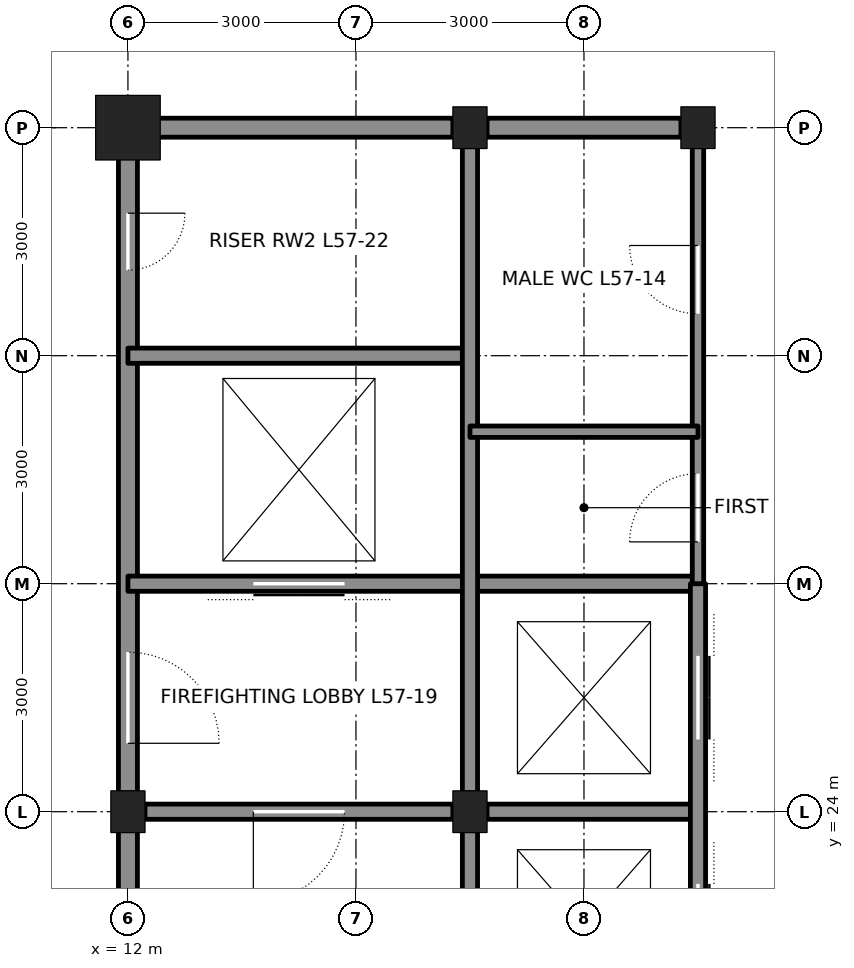
"""IFC4 building model, lengths in metres.
Left out: names, types, materials, properties, quantities, classifications, styles, units other than length and angle.
Written with IfcOpenShell. Run it as: python <this file> out.ifc"""

import sys

from ifc_helpers import new_model, si_unit, direction, frame, frame_2d, origin, origin_2d, place, context, subcontext, project, spatial, rectangle, hollow_rectangle, i_section, extrude, element, fill, save


model = new_model("IFC4")
c1 = context("Model", 3, precision=1e-05, world=origin(), true_north=direction((0.0, 1.0)))
c2 = subcontext(c1, "Body", "Model", "MODEL_VIEW")
j1 = project(units=[si_unit("LENGTHUNIT", "METRE"), si_unit("PLANEANGLEUNIT", "RADIAN")], contexts=[c1])
p1 = place(None, origin())
s1 = spatial("IfcSite", under=j1, at=p1, CompositionType="ELEMENT")
p2 = place(p1, origin())
s2 = spatial("IfcBuilding", under=s1, at=p2, CompositionType="ELEMENT")
p3 = place(p2, frame((0.0, 0.0, 257.7)))
s3 = spatial("IfcBuildingStorey", under=s2, at=p3, CompositionType="ELEMENT", Elevation=257.7)
p4 = place(p3, frame((12.0, 33.0, 0.0), z_axis=(0.0, 0.0, 1.0), x_axis=(1.0, 0.0, 0.0)))
e1 = element("IfcColumn", 1, at=p4, inside=s3, PredefinedType="COLUMN", context=c2, shape_type="SweptSolid", body=[
    extrude(hollow_rectangle(XDim=0.85, YDim=0.85, WallThickness=0.085, at=origin_2d()), origin(), (0.0, 0.0, 1.0), 4.5),
])
for number, where, z_axis, x_axis in (
    (2, (16.5, 33.0, 0.0), (0.0, 0.0, 1.0), (1.0, 0.0, 0.0)),
    (3, (19.5, 33.0, 0.0), (0.0, 0.0, 1.0), (1.0, 0.0, 0.0)),
    (4, (12.0, 24.0, 0.0), (0.0, 0.0, 1.0), (1.0, 0.0, 0.0)),
    (5, (16.5, 24.0, 0.0), (0.0, 0.0, 1.0), (1.0, 0.0, 0.0)),
):
    element("IfcColumn", number, at=place(p3, frame(where, z_axis=z_axis, x_axis=x_axis)), inside=s3, PredefinedType="COLUMN", context=c2, shape_type="SweptSolid", body=[
        extrude(i_section(OverallWidth=0.449, OverallDepth=0.549, WebThickness=0.072, FlangeThickness=0.115, at=origin_2d()), origin(), (0.0, 0.0, 1.0), 4.5),
    ])
p5 = place(p3, frame((12.0, 21.25, 0.0), z_axis=(0.0, 0.0, 1.0), x_axis=(0.0, 1.0, 0.0)))
e6 = element("IfcWall", 6, at=p5, inside=s3, PredefinedType="SOLIDWALL", context=c2, shape_type="SweptSolid", body=[
    extrude(rectangle(XDim=2.5, YDim=0.25, at=frame_2d((1.25, 0.0))), origin(), (0.0, 0.0, 1.0), 3.413),
])
p6 = place(p3, frame((12.0, 24.25, 0.0), z_axis=(0.0, 0.0, 1.0), x_axis=(0.0, 1.0, 0.0)))
e7 = element("IfcWall", 7, at=p6, inside=s3, PredefinedType="SOLIDWALL", context=c2, shape_type="SweptSolid", body=[
    extrude(rectangle(XDim=8.5, YDim=0.25, at=frame_2d((4.25, 0.0))), origin(), (0.0, 0.0, 1.0), 3.413),
])
p7 = place(p6, frame((0.65, 0.0, 0.0)))
e8 = element("IfcOpeningElement", 8, at=p7, cuts=e7, PredefinedType="OPENING", context=c2, shape_type="SweptSolid", body=[
    extrude(rectangle(XDim=1.2, YDim=2.1, at=frame_2d((0.6, 1.05))), frame((0.0, 0.135, 0.0), z_axis=(0.0, -1.0, 0.0), x_axis=(1.0, 0.0, 0.0)), (0.0, 0.0, 1.0), 0.27),
])
p8 = place(p6, frame((6.875, 0.0, 0.0)))
e9 = element("IfcOpeningElement", 9, at=p8, cuts=e7, PredefinedType="OPENING", context=c2, shape_type="SweptSolid", body=[
    extrude(rectangle(XDim=0.75, YDim=2.1, at=frame_2d((0.375, 1.05))), frame((0.0, 0.135, 0.0), z_axis=(0.0, -1.0, 0.0), x_axis=(1.0, 0.0, 0.0)), (0.0, 0.0, 1.0), 0.27),
])
p9 = place(p3, frame((12.225, 24.0, 0.0), z_axis=(0.0, 0.0, 1.0), x_axis=(1.0, 0.0, 0.0)))
e10 = element("IfcWall", 10, at=p9, inside=s3, PredefinedType="SOLIDWALL", context=c2, shape_type="SweptSolid", body=[
    extrude(rectangle(XDim=4.05, YDim=0.2, at=frame_2d((2.025, 0.0))), origin(), (0.0, 0.0, 1.0), 3.39),
])
p10 = place(p9, frame((1.425, 0.0, 0.0)))
e11 = element("IfcOpeningElement", 11, at=p10, cuts=e10, PredefinedType="OPENING", context=c2, shape_type="SweptSolid", body=[
    extrude(rectangle(XDim=1.2, YDim=2.1, at=frame_2d((0.6, 1.05))), frame((0.0, 0.11, 0.0), z_axis=(0.0, -1.0, 0.0), x_axis=(1.0, 0.0, 0.0)), (0.0, 0.0, 1.0), 0.22),
])
p11 = place(p3, frame((16.725, 24.0, 0.0), z_axis=(0.0, 0.0, 1.0), x_axis=(1.0, 0.0, 0.0)))
e12 = element("IfcWall", 12, at=p11, inside=s3, PredefinedType="SOLIDWALL", context=c2, shape_type="SweptSolid", body=[
    extrude(rectangle(XDim=2.775, YDim=0.2, at=frame_2d((1.388, 0.0))), origin(), (0.0, 0.0, 1.0), 3.39),
])
p12 = place(p3, frame((12.0, 27.0, 0.0), z_axis=(0.0, 0.0, 1.0), x_axis=(1.0, 0.0, 0.0)))
e13 = element("IfcWall", 13, at=p12, inside=s3, PredefinedType="SOLIDWALL", context=c2, shape_type="SweptSolid", body=[
    extrude(rectangle(XDim=7.5, YDim=0.2, at=frame_2d((3.75, 0.0))), origin(), (0.0, 0.0, 1.0), 4.34),
])
p13 = place(p12, frame((1.65, 0.0, 0.0)))
e14 = element("IfcOpeningElement", 14, at=p13, cuts=e13, PredefinedType="OPENING", context=c2, shape_type="SweptSolid", body=[
    extrude(rectangle(XDim=1.2, YDim=2.1, at=frame_2d((0.6, 1.05))), frame((0.0, 0.11, 0.0), z_axis=(0.0, -1.0, 0.0), x_axis=(1.0, 0.0, 0.0)), (0.0, 0.0, 1.0), 0.22),
])
p14 = place(p3, frame((12.0, 30.0, 0.0), z_axis=(0.0, 0.0, 1.0), x_axis=(1.0, 0.0, 0.0)))
e15 = element("IfcWall", 15, at=p14, inside=s3, PredefinedType="SOLIDWALL", context=c2, shape_type="SweptSolid", body=[
    extrude(rectangle(XDim=4.5, YDim=0.2, at=frame_2d((2.25, 0.0))), origin(), (0.0, 0.0, 1.0), 4.34),
])
p15 = place(p3, frame((12.25, 33.0, 0.0), z_axis=(0.0, 0.0, 1.0), x_axis=(1.0, 0.0, 0.0)))
e16 = element("IfcWall", 16, at=p15, inside=s3, PredefinedType="SOLIDWALL", context=c2, shape_type="SweptSolid", body=[
    extrude(rectangle(XDim=4.025, YDim=0.25, at=frame_2d((2.013, 0.0))), origin(), (0.0, 0.0, 1.0), 3.481),
])
p16 = place(p3, frame((16.725, 33.0, 0.0), z_axis=(0.0, 0.0, 1.0), x_axis=(1.0, 0.0, 0.0)))
e17 = element("IfcWall", 17, at=p16, inside=s3, PredefinedType="SOLIDWALL", context=c2, shape_type="SweptSolid", body=[
    extrude(rectangle(XDim=2.55, YDim=0.25, at=frame_2d((1.275, 0.0))), origin(), (0.0, 0.0, 1.0), 3.481),
])
p17 = place(p3, frame((16.5, 21.25, 0.0), z_axis=(0.0, 0.0, 1.0), x_axis=(0.0, 1.0, 0.0)))
e18 = element("IfcWall", 18, at=p17, inside=s3, PredefinedType="SOLIDWALL", context=c2, shape_type="SweptSolid", body=[
    extrude(rectangle(XDim=2.5, YDim=0.2, at=frame_2d((1.25, 0.0))), origin(), (0.0, 0.0, 1.0), 3.413),
])
p18 = place(p3, frame((16.5, 24.25, 0.0), z_axis=(0.0, 0.0, 1.0), x_axis=(0.0, 1.0, 0.0)))
e19 = element("IfcWall", 19, at=p18, inside=s3, PredefinedType="SOLIDWALL", context=c2, shape_type="SweptSolid", body=[
    extrude(rectangle(XDim=8.5, YDim=0.2, at=frame_2d((4.25, 0.0))), origin(), (0.0, 0.0, 1.0), 3.413),
])
p19 = place(p3, frame((19.5, 15.0, 0.0), z_axis=(0.0, 0.0, 1.0), x_axis=(0.0, 1.0, 0.0)))
e20 = element("IfcWall", 20, at=p19, inside=s3, PredefinedType="SOLIDWALL", context=c2, shape_type="SweptSolid", body=[
    extrude(rectangle(XDim=12.0, YDim=0.2, at=frame_2d((6.0, 0.0))), origin(), (0.0, 0.0, 1.0), 3.365),
])
p20 = place(p19, frame((0.95, 0.0, 0.0)))
e21 = element("IfcOpeningElement", 21, at=p20, cuts=e20, PredefinedType="OPENING", context=c2, shape_type="SweptSolid", body=[
    extrude(rectangle(XDim=1.1, YDim=2.1, at=frame_2d((0.55, 1.05))), frame((0.0, 0.11, 0.0), z_axis=(0.0, -1.0, 0.0), x_axis=(1.0, 0.0, 0.0)), (0.0, 0.0, 1.0), 0.22),
])
p21 = place(p19, frame((3.95, 0.0, 0.0)))
e22 = element("IfcOpeningElement", 22, at=p21, cuts=e20, PredefinedType="OPENING", context=c2, shape_type="SweptSolid", body=[
    extrude(rectangle(XDim=1.1, YDim=2.1, at=frame_2d((0.55, 1.05))), frame((0.0, 0.11, 0.0), z_axis=(0.0, -1.0, 0.0), x_axis=(1.0, 0.0, 0.0)), (0.0, 0.0, 1.0), 0.22),
])
p22 = place(p19, frame((6.95, 0.0, 0.0)))
e23 = element("IfcOpeningElement", 23, at=p22, cuts=e20, PredefinedType="OPENING", context=c2, shape_type="SweptSolid", body=[
    extrude(rectangle(XDim=1.1, YDim=2.1, at=frame_2d((0.55, 1.05))), frame((0.0, 0.11, 0.0), z_axis=(0.0, -1.0, 0.0), x_axis=(1.0, 0.0, 0.0)), (0.0, 0.0, 1.0), 0.22),
])
p23 = place(p19, frame((9.95, 0.0, 0.0)))
e24 = element("IfcOpeningElement", 24, at=p23, cuts=e20, PredefinedType="OPENING", context=c2, shape_type="SweptSolid", body=[
    extrude(rectangle(XDim=1.1, YDim=2.1, at=frame_2d((0.55, 1.05))), frame((0.0, 0.11, 0.0), z_axis=(0.0, -1.0, 0.0), x_axis=(1.0, 0.0, 0.0)), (0.0, 0.0, 1.0), 0.22),
])
p24 = place(p3, frame((19.5, 27.0, 0.0), z_axis=(0.0, 0.0, 1.0), x_axis=(0.0, 1.0, 0.0)))
e25 = element("IfcWall", 25, at=p24, inside=s3, PredefinedType="PARTITIONING", context=c2, shape_type="SweptSolid", body=[
    extrude(rectangle(XDim=5.75, YDim=0.15, at=frame_2d((2.875, 0.0))), origin(), (0.0, 0.0, 1.0), 3.365),
])
p25 = place(p24, frame((0.55, 0.0, 0.0)))
e26 = element("IfcOpeningElement", 26, at=p25, cuts=e25, PredefinedType="OPENING", context=c2, shape_type="SweptSolid", body=[
    extrude(rectangle(XDim=0.9, YDim=2.1, at=frame_2d((0.45, 1.05))), frame((0.0, 0.085, 0.0), z_axis=(0.0, -1.0, 0.0), x_axis=(1.0, 0.0, 0.0)), (0.0, 0.0, 1.0), 0.17),
])
p26 = place(p24, frame((3.55, 0.0, 0.0)))
e27 = element("IfcOpeningElement", 27, at=p26, cuts=e25, PredefinedType="OPENING", context=c2, shape_type="SweptSolid", body=[
    extrude(rectangle(XDim=0.9, YDim=2.1, at=frame_2d((0.45, 1.05))), frame((0.0, 0.085, 0.0), z_axis=(0.0, -1.0, 0.0), x_axis=(1.0, 0.0, 0.0)), (0.0, 0.0, 1.0), 0.17),
])
p27 = place(p3, frame((16.5, 29.0, 0.0), z_axis=(0.0, 0.0, 1.0), x_axis=(1.0, 0.0, 0.0)))
e28 = element("IfcWall", 28, at=p27, inside=s3, PredefinedType="PARTITIONING", context=c2, shape_type="SweptSolid", body=[
    extrude(rectangle(XDim=3.0, YDim=0.15, at=frame_2d((1.5, 0.0))), origin(), (0.0, 0.0, 1.0), 4.34),
])
p28 = place(p10, frame((1.2, 0.0, 0.0), z_axis=(0.0, 0.0, 1.0), x_axis=(-1.0, 0.0, 0.0)))
e29 = element("IfcDoor", 29, at=p28, inside=s3, OperationType="SINGLE_SWING_RIGHT", PredefinedType="DOOR", context=c2, shape_type="SweptSolid", body=[
    extrude(rectangle(XDim=1.2, YDim=2.1, at=frame_2d((0.6, 1.05))), frame((0.0, 0.025, 0.0), z_axis=(0.0, -1.0, 0.0), x_axis=(1.0, 0.0, 0.0)), (0.0, 0.0, 1.0), 0.05),
])
fill(e11, e29)
p29 = place(p7, frame((1.2, 0.0, 0.0), z_axis=(0.0, 0.0, 1.0), x_axis=(-1.0, 0.0, 0.0)))
e30 = element("IfcDoor", 30, at=p29, inside=s3, OperationType="SINGLE_SWING_RIGHT", PredefinedType="DOOR", context=c2, shape_type="SweptSolid", body=[
    extrude(rectangle(XDim=1.2, YDim=2.1, at=frame_2d((0.6, 1.05))), frame((0.0, 0.025, 0.0), z_axis=(0.0, -1.0, 0.0), x_axis=(1.0, 0.0, 0.0)), (0.0, 0.0, 1.0), 0.05),
])
fill(e8, e30)
p30 = place(p13, origin())
e31 = element("IfcDoor", 31, at=p30, inside=s3, OperationType="DOUBLE_DOOR_SLIDING", PredefinedType="DOOR", context=c2, shape_type="SweptSolid", body=[
    extrude(rectangle(XDim=1.2, YDim=2.1, at=frame_2d((0.6, 1.05))), frame((0.0, 0.025, 0.0), z_axis=(0.0, -1.0, 0.0), x_axis=(1.0, 0.0, 0.0)), (0.0, 0.0, 1.0), 0.05),
])
fill(e14, e31)
p31 = place(p8, frame((0.75, 0.0, 0.0), z_axis=(0.0, 0.0, 1.0), x_axis=(-1.0, 0.0, 0.0)))
e32 = element("IfcDoor", 32, at=p31, inside=s3, OperationType="SINGLE_SWING_LEFT", PredefinedType="DOOR", context=c2, shape_type="SweptSolid", body=[
    extrude(rectangle(XDim=0.75, YDim=2.1, at=frame_2d((0.375, 1.05))), frame((0.0, 0.025, 0.0), z_axis=(0.0, -1.0, 0.0), x_axis=(1.0, 0.0, 0.0)), (0.0, 0.0, 1.0), 0.05),
])
fill(e9, e32)
p32 = place(p25, origin())
e33 = element("IfcDoor", 33, at=p32, inside=s3, OperationType="SINGLE_SWING_LEFT", PredefinedType="DOOR", context=c2, shape_type="SweptSolid", body=[
    extrude(rectangle(XDim=0.9, YDim=2.1, at=frame_2d((0.45, 1.05))), frame((0.0, 0.025, 0.0), z_axis=(0.0, -1.0, 0.0), x_axis=(1.0, 0.0, 0.0)), (0.0, 0.0, 1.0), 0.05),
])
fill(e26, e33)
p33 = place(p26, origin())
e34 = element("IfcDoor", 34, at=p33, inside=s3, OperationType="SINGLE_SWING_RIGHT", PredefinedType="DOOR", context=c2, shape_type="SweptSolid", body=[
    extrude(rectangle(XDim=0.9, YDim=2.1, at=frame_2d((0.45, 1.05))), frame((0.0, 0.025, 0.0), z_axis=(0.0, -1.0, 0.0), x_axis=(1.0, 0.0, 0.0)), (0.0, 0.0, 1.0), 0.05),
])
fill(e27, e34)
p34 = place(p22, origin())
e35 = element("IfcDoor", 35, at=p34, inside=s3, OperationType="DOUBLE_DOOR_SLIDING", PredefinedType="DOOR", context=c2, shape_type="SweptSolid", body=[
    extrude(rectangle(XDim=1.1, YDim=2.1, at=frame_2d((0.55, 1.05))), frame((0.0, 0.025, 0.0), z_axis=(0.0, -1.0, 0.0), x_axis=(1.0, 0.0, 0.0)), (0.0, 0.0, 1.0), 0.05),
])
fill(e23, e35)
p35 = place(p23, origin())
e36 = element("IfcDoor", 36, at=p35, inside=s3, OperationType="DOUBLE_DOOR_SLIDING", PredefinedType="DOOR", context=c2, shape_type="SweptSolid", body=[
    extrude(rectangle(XDim=1.1, YDim=2.1, at=frame_2d((0.55, 1.05))), frame((0.0, 0.025, 0.0), z_axis=(0.0, -1.0, 0.0), x_axis=(1.0, 0.0, 0.0)), (0.0, 0.0, 1.0), 0.05),
])
fill(e24, e36)
save(model, sys.argv[1])
